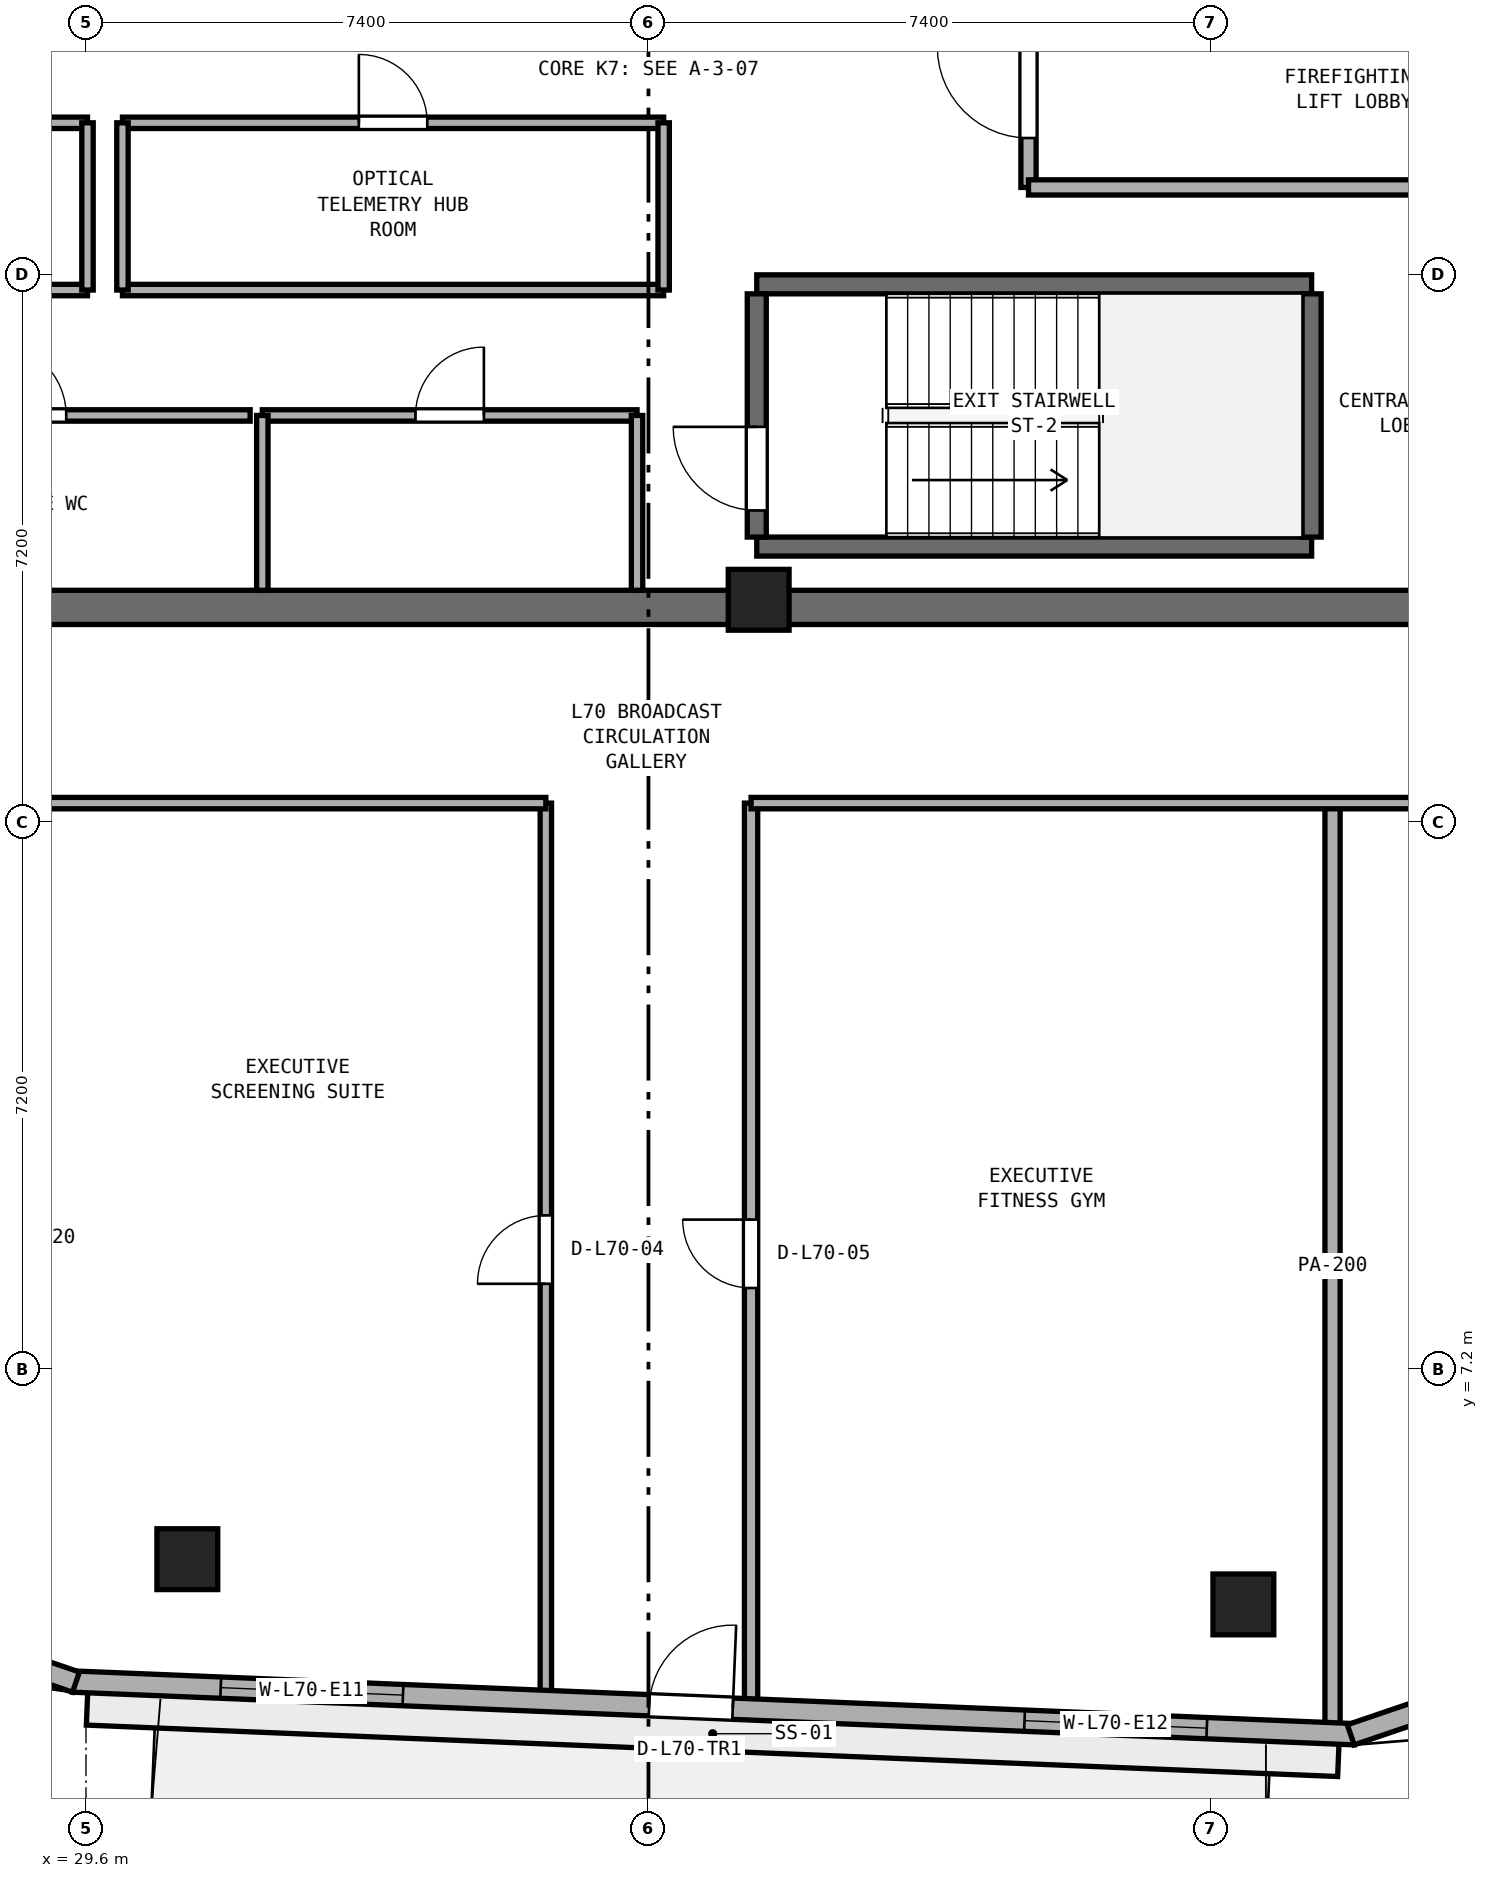
"""IFC4 building model, lengths in metres.
Left out: names, types, materials, properties, quantities, classifications, styles, units other than length and angle.
Written with IfcOpenShell. Run it as: python <this file> out.ifc"""

import sys

from ifc_helpers import new_model, si_unit, direction, frame, frame_2d, origin, origin_2d, place, context, subcontext, project, spatial, rectangle, extrude, element, fill, save


model = new_model("IFC4")
c1 = context("Model", 3, precision=1e-05, world=origin(), true_north=direction((0.0, 1.0)))
c2 = subcontext(c1, "Body", "Model", "MODEL_VIEW")
j1 = project(units=[si_unit("LENGTHUNIT", "METRE"), si_unit("PLANEANGLEUNIT", "RADIAN")], contexts=[c1])
p1 = place(None, origin())
s1 = spatial("IfcSite", under=j1, at=p1, CompositionType="ELEMENT")
p2 = place(p1, origin())
s2 = spatial("IfcBuilding", under=s1, at=p2, CompositionType="ELEMENT")
p3 = place(p2, frame((0.0, 0.0, 274.4)))
s3 = spatial("IfcBuildingStorey", under=s2, at=p3, CompositionType="ELEMENT", Elevation=274.4)
p4 = place(p3, frame((25.4, 17.225, 0.0), z_axis=(0.0, 0.0, 1.0), x_axis=(1.0, 0.0, 0.0)))
e1 = element("IfcWall", 1, at=p4, inside=s3, PredefinedType="SHEAR", context=c2, shape_type="SweptSolid", body=[
    extrude(rectangle(XDim=23.2, YDim=0.45, at=frame_2d((11.6, 0.0))), origin(), (0.0, 0.0, 1.0), 3.54),
])
p5 = place(p3, frame((38.45, 17.325, 0.0), z_axis=(0.0, 0.0, 1.0), x_axis=(1.0, 0.0, 0.0)))
e2 = element("IfcColumn", 2, at=p5, inside=s3, PredefinedType="PILASTER", context=c2, shape_type="SweptSolid", body=[
    extrude(rectangle(XDim=0.8, YDim=0.8, at=origin_2d()), origin(), (0.0, 0.0, 1.0), 3.8),
])
for number, where, z_axis, x_axis in (
    (3, (30.934, 4.703, 0.0), (0.0, 0.0, 1.0), (1.0, 0.0, 0.0)),
    (4, (44.827, 4.108, 0.0), (0.0, 0.0, 1.0), (1.0, 0.0, 0.0)),
):
    element("IfcColumn", number, at=place(p3, frame(where, z_axis=z_axis, x_axis=x_axis)), inside=s3, PredefinedType="COLUMN", context=c2, shape_type="SweptSolid", body=[
        extrude(rectangle(XDim=0.8, YDim=0.8, at=origin_2d()), origin(), (0.0, 0.0, 1.0), 3.8),
    ])
for number, where, z_axis, x_axis in (
    (5, (38.425, 18.025, 0.0), (0.0, 0.0, 1.0), (1.0, 0.0, 0.0)),
    (6, (38.425, 21.475, 0.0), (0.0, 0.0, 1.0), (1.0, 0.0, 0.0)),
):
    element("IfcWall", number, at=place(p3, frame(where, z_axis=z_axis, x_axis=x_axis)), inside=s3, PredefinedType="SHEAR", context=c2, shape_type="SweptSolid", body=[
        extrude(rectangle(XDim=7.3, YDim=0.25, at=frame_2d((3.65, 0.0))), origin(), (0.0, 0.0, 1.0), 3.54),
    ])
p6 = place(p3, frame((38.425, 18.15, 0.0), z_axis=(0.0, 0.0, 1.0), x_axis=(0.0, 1.0, 0.0)))
e7 = element("IfcWall", 7, at=p6, inside=s3, PredefinedType="SHEAR", context=c2, shape_type="SweptSolid", body=[
    extrude(rectangle(XDim=3.2, YDim=0.25, at=frame_2d((1.6, 0.0))), origin(), (0.0, 0.0, 1.0), 3.54),
])
p7 = place(p6, frame((0.35, 0.0, 0.0)))
e8 = element("IfcOpeningElement", 8, at=p7, cuts=e7, PredefinedType="OPENING", context=c2, shape_type="SweptSolid", body=[
    extrude(rectangle(XDim=1.1, YDim=2.15, at=frame_2d((0.55, 1.075))), frame((0.0, 0.135, 0.0), z_axis=(0.0, -1.0, 0.0), x_axis=(1.0, 0.0, 0.0)), (0.0, 0.0, 1.0), 0.27),
])
p8 = place(p3, frame((45.725, 18.15, 0.0), z_axis=(0.0, 0.0, 1.0), x_axis=(0.0, 1.0, 0.0)))
e9 = element("IfcWall", 9, at=p8, inside=s3, PredefinedType="SHEAR", context=c2, shape_type="SweptSolid", body=[
    extrude(rectangle(XDim=3.2, YDim=0.25, at=frame_2d((1.6, 0.0))), origin(), (0.0, 0.0, 1.0), 3.54),
])
p9 = place(p3, frame((42.0, 22.75, 0.0), z_axis=(0.0, 0.0, 1.0), x_axis=(0.0, 1.0, 0.0)))
e10 = element("IfcWall", 10, at=p9, inside=s3, PredefinedType="SOLIDWALL", context=c2, shape_type="SweptSolid", body=[
    extrude(rectangle(XDim=6.05, YDim=0.2, at=frame_2d((3.025, 0.0))), origin(), (0.0, 0.0, 1.0), 3.54),
])
p10 = place(p9, frame((0.65, 0.0, 0.0)))
e11 = element("IfcOpeningElement", 11, at=p10, cuts=e10, PredefinedType="OPENING", context=c2, shape_type="SweptSolid", body=[
    extrude(rectangle(XDim=1.2, YDim=2.15, at=frame_2d((0.6, 1.075))), frame((0.0, 0.11, 0.0), z_axis=(0.0, -1.0, 0.0), x_axis=(1.0, 0.0, 0.0)), (0.0, 0.0, 1.0), 0.22),
])
p11 = place(p3, frame((42.0, 22.75, 0.0), z_axis=(0.0, 0.0, 1.0), x_axis=(1.0, 0.0, 0.0)))
e12 = element("IfcWall", 12, at=p11, inside=s3, PredefinedType="SOLIDWALL", context=c2, shape_type="SweptSolid", body=[
    extrude(rectangle(XDim=6.15, YDim=0.2, at=frame_2d((3.075, 0.0))), origin(), (0.0, 0.0, 1.0), 3.54),
])
p12 = place(p3, frame((25.97, 19.75, 0.0), z_axis=(0.0, 0.0, 1.0), x_axis=(1.0, 0.0, 0.0)))
e13 = element("IfcWall", 13, at=p12, inside=s3, PredefinedType="PARTITIONING", context=c2, shape_type="SweptSolid", body=[
    extrude(rectangle(XDim=5.79, YDim=0.15, at=frame_2d((2.895, 0.0))), origin(), (0.0, 0.0, 1.0), 3.54),
])
p13 = place(p12, frame((2.42, 0.0, 0.0)))
e14 = element("IfcOpeningElement", 14, at=p13, cuts=e13, PredefinedType="OPENING", context=c2, shape_type="SweptSolid", body=[
    extrude(rectangle(XDim=0.95, YDim=2.1, at=frame_2d((0.475, 1.05))), frame((0.0, 0.085, 0.0), z_axis=(0.0, -1.0, 0.0), x_axis=(1.0, 0.0, 0.0)), (0.0, 0.0, 1.0), 0.17),
])
p14 = place(p3, frame((31.92, 19.75, 0.0), z_axis=(0.0, 0.0, 1.0), x_axis=(1.0, 0.0, 0.0)))
e15 = element("IfcWall", 15, at=p14, inside=s3, PredefinedType="PARTITIONING", context=c2, shape_type="SweptSolid", body=[
    extrude(rectangle(XDim=4.93, YDim=0.15, at=frame_2d((2.465, 0.0))), origin(), (0.0, 0.0, 1.0), 3.54),
])
p15 = place(p14, frame((2.015, 0.0, 0.0)))
e16 = element("IfcOpeningElement", 16, at=p15, cuts=e15, PredefinedType="OPENING", context=c2, shape_type="SweptSolid", body=[
    extrude(rectangle(XDim=0.9, YDim=2.1, at=frame_2d((0.45, 1.05))), frame((0.0, 0.085, 0.0), z_axis=(0.0, -1.0, 0.0), x_axis=(1.0, 0.0, 0.0)), (0.0, 0.0, 1.0), 0.17),
])
for number, where, z_axis, x_axis in (
    (17, (31.92, 17.45, 0.0), (0.0, 0.0, 1.0), (0.0, 1.0, 0.0)),
    (18, (36.85, 17.45, 0.0), (0.0, 0.0, 1.0), (0.0, 1.0, 0.0)),
):
    element("IfcWall", number, at=place(p3, frame(where, z_axis=z_axis, x_axis=x_axis)), inside=s3, PredefinedType="PARTITIONING", context=c2, shape_type="SweptSolid", body=[
        extrude(rectangle(XDim=2.3, YDim=0.15, at=frame_2d((1.15, 0.0))), origin(), (0.0, 0.0, 1.0), 3.54),
    ])
p16 = place(p3, frame((25.97, 21.4, 0.0), z_axis=(0.0, 0.0, 1.0), x_axis=(1.0, 0.0, 0.0)))
e19 = element("IfcWall", 19, at=p16, inside=s3, PredefinedType="PARTITIONING", context=c2, shape_type="SweptSolid", body=[
    extrude(rectangle(XDim=3.65, YDim=0.15, at=frame_2d((1.825, 0.0))), origin(), (0.0, 0.0, 1.0), 3.54),
])
p17 = place(p3, frame((25.97, 23.6, 0.0), z_axis=(0.0, 0.0, 1.0), x_axis=(1.0, 0.0, 0.0)))
e20 = element("IfcWall", 20, at=p17, inside=s3, PredefinedType="PARTITIONING", context=c2, shape_type="SweptSolid", body=[
    extrude(rectangle(XDim=3.65, YDim=0.15, at=frame_2d((1.825, 0.0))), origin(), (0.0, 0.0, 1.0), 3.54),
])
p18 = place(p17, frame((1.375, 0.0, 0.0)))
e21 = element("IfcOpeningElement", 21, at=p18, cuts=e20, PredefinedType="OPENING", context=c2, shape_type="SweptSolid", body=[
    extrude(rectangle(XDim=0.9, YDim=2.1, at=frame_2d((0.45, 1.05))), frame((0.0, 0.085, 0.0), z_axis=(0.0, -1.0, 0.0), x_axis=(1.0, 0.0, 0.0)), (0.0, 0.0, 1.0), 0.17),
])
p19 = place(p3, frame((29.62, 21.4, 0.0), z_axis=(0.0, 0.0, 1.0), x_axis=(0.0, 1.0, 0.0)))
e22 = element("IfcWall", 22, at=p19, inside=s3, PredefinedType="PARTITIONING", context=c2, shape_type="SweptSolid", body=[
    extrude(rectangle(XDim=2.2, YDim=0.15, at=frame_2d((1.1, 0.0))), origin(), (0.0, 0.0, 1.0), 3.54),
])
p20 = place(p3, frame((30.08, 21.4, 0.0), z_axis=(0.0, 0.0, 1.0), x_axis=(1.0, 0.0, 0.0)))
e23 = element("IfcWall", 23, at=p20, inside=s3, PredefinedType="PARTITIONING", context=c2, shape_type="SweptSolid", body=[
    extrude(rectangle(XDim=7.12, YDim=0.15, at=frame_2d((3.56, 0.0))), origin(), (0.0, 0.0, 1.0), 3.54),
])
p21 = place(p3, frame((30.08, 23.6, 0.0), z_axis=(0.0, 0.0, 1.0), x_axis=(1.0, 0.0, 0.0)))
e24 = element("IfcWall", 24, at=p21, inside=s3, PredefinedType="PARTITIONING", context=c2, shape_type="SweptSolid", body=[
    extrude(rectangle(XDim=7.12, YDim=0.15, at=frame_2d((3.56, 0.0))), origin(), (0.0, 0.0, 1.0), 3.54),
])
p22 = place(p21, frame((3.11, 0.0, 0.0)))
e25 = element("IfcOpeningElement", 25, at=p22, cuts=e24, PredefinedType="OPENING", context=c2, shape_type="SweptSolid", body=[
    extrude(rectangle(XDim=0.9, YDim=2.1, at=frame_2d((0.45, 1.05))), frame((0.0, 0.085, 0.0), z_axis=(0.0, -1.0, 0.0), x_axis=(1.0, 0.0, 0.0)), (0.0, 0.0, 1.0), 0.17),
])
for number, where, z_axis, x_axis in (
    (26, (30.08, 21.4, 0.0), (0.0, 0.0, 1.0), (0.0, 1.0, 0.0)),
    (27, (37.2, 21.4, 0.0), (0.0, 0.0, 1.0), (0.0, 1.0, 0.0)),
):
    element("IfcWall", number, at=place(p3, frame(where, z_axis=z_axis, x_axis=x_axis)), inside=s3, PredefinedType="PARTITIONING", context=c2, shape_type="SweptSolid", body=[
        extrude(rectangle(XDim=2.2, YDim=0.15, at=frame_2d((1.1, 0.0))), origin(), (0.0, 0.0, 1.0), 3.54),
    ])
p23 = place(p3, frame((46.0, 2.477, 0.0), z_axis=(0.0, 0.0, 1.0), x_axis=(0.0, 1.0, 0.0)))
e28 = element("IfcWall", 28, at=p23, inside=s3, PredefinedType="PARTITIONING", context=c2, shape_type="SweptSolid", body=[
    extrude(rectangle(XDim=12.173, YDim=0.2, at=frame_2d((6.086, 0.0))), origin(), (0.0, 0.0, 1.0), 3.54),
])
p24 = place(p3, frame((38.35, 2.792, 0.0), z_axis=(0.0, 0.0, 1.0), x_axis=(0.0, 1.0, 0.0)))
e29 = element("IfcWall", 29, at=p24, inside=s3, PredefinedType="PARTITIONING", context=c2, shape_type="SweptSolid", body=[
    extrude(rectangle(XDim=11.858, YDim=0.175, at=frame_2d((5.929, 0.0))), origin(), (0.0, 0.0, 1.0), 3.54),
])
p25 = place(p24, frame((5.479, 0.0, 0.0)))
e30 = element("IfcOpeningElement", 30, at=p25, cuts=e29, PredefinedType="OPENING", context=c2, shape_type="SweptSolid", body=[
    extrude(rectangle(XDim=0.9, YDim=2.1, at=frame_2d((0.45, 1.05))), frame((0.0, 0.097, 0.0), z_axis=(0.0, -1.0, 0.0), x_axis=(1.0, 0.0, 0.0)), (0.0, 0.0, 1.0), 0.195),
])
p26 = place(p3, frame((35.65, 2.902, 0.0), z_axis=(0.0, 0.0, 1.0), x_axis=(0.0, 1.0, 0.0)))
e31 = element("IfcWall", 31, at=p26, inside=s3, PredefinedType="PARTITIONING", context=c2, shape_type="SweptSolid", body=[
    extrude(rectangle(XDim=11.748, YDim=0.15, at=frame_2d((5.874, 0.0))), origin(), (0.0, 0.0, 1.0), 3.54),
])
p27 = place(p26, frame((5.424, 0.0, 0.0)))
e32 = element("IfcOpeningElement", 32, at=p27, cuts=e31, PredefinedType="OPENING", context=c2, shape_type="SweptSolid", body=[
    extrude(rectangle(XDim=0.9, YDim=2.1, at=frame_2d((0.45, 1.05))), frame((0.0, 0.085, 0.0), z_axis=(0.0, -1.0, 0.0), x_axis=(1.0, 0.0, 0.0)), (0.0, 0.0, 1.0), 0.17),
])
p28 = place(p3, frame((23.05, 14.65, 0.0), z_axis=(0.0, 0.0, 1.0), x_axis=(1.0, 0.0, 0.0)))
e33 = element("IfcWall", 33, at=p28, inside=s3, PredefinedType="PARTITIONING", context=c2, shape_type="SweptSolid", body=[
    extrude(rectangle(XDim=12.6, YDim=0.15, at=frame_2d((6.3, 0.0))), origin(), (0.0, 0.0, 1.0), 3.54),
])
p29 = place(p28, frame((2.645, 0.0, 0.0)))
e34 = element("IfcOpeningElement", 34, at=p29, cuts=e33, PredefinedType="OPENING", context=c2, shape_type="SweptSolid", body=[
    extrude(rectangle(XDim=0.9, YDim=2.1, at=frame_2d((0.45, 1.05))), frame((0.0, 0.085, 0.0), z_axis=(0.0, -1.0, 0.0), x_axis=(1.0, 0.0, 0.0)), (0.0, 0.0, 1.0), 0.17),
])
p30 = place(p3, frame((38.35, 14.65, 0.0), z_axis=(0.0, 0.0, 1.0), x_axis=(1.0, 0.0, 0.0)))
e35 = element("IfcWall", 35, at=p30, inside=s3, PredefinedType="PARTITIONING", context=c2, shape_type="SweptSolid", body=[
    extrude(rectangle(XDim=12.6, YDim=0.15, at=frame_2d((6.3, 0.0))), origin(), (0.0, 0.0, 1.0), 3.54),
])
p31 = place(p30, frame((9.555, 0.0, 0.0)))
e36 = element("IfcOpeningElement", 36, at=p31, cuts=e35, PredefinedType="OPENING", context=c2, shape_type="SweptSolid", body=[
    extrude(rectangle(XDim=0.9, YDim=2.1, at=frame_2d((0.45, 1.05))), frame((0.0, 0.085, 0.0), z_axis=(0.0, -1.0, 0.0), x_axis=(1.0, 0.0, 0.0)), (0.0, 0.0, 1.0), 0.17),
])
p32 = place(p3, frame((29.428, 3.093, 0.0), z_axis=(0.0, 0.0, 1.0), x_axis=(0.999156257967, -0.041070331944, 0.0)))
e37 = element("IfcWall", 37, at=p32, inside=s3, PredefinedType="STANDARD", context=c2, shape_type="SweptSolid", body=[
    extrude(rectangle(XDim=16.876, YDim=0.28, at=frame_2d((8.438, 0.0))), origin(), (0.0, 0.0, 1.0), 3.54),
])
p33 = place(p32, frame((7.588, 0.0, 0.0)))
e38 = element("IfcOpeningElement", 38, at=p33, cuts=e37, PredefinedType="OPENING", context=c2, shape_type="SweptSolid", body=[
    extrude(rectangle(XDim=1.1, YDim=2.2, at=frame_2d((0.55, 1.1))), frame((0.0, 0.15, 0.0), z_axis=(0.0, -1.0, 0.0), x_axis=(1.0, 0.0, 0.0)), (0.0, 0.0, 1.0), 0.3),
])
p34 = place(p32, frame((1.946, 0.0, 0.9)))
e39 = element("IfcOpeningElement", 39, at=p34, cuts=e37, PredefinedType="OPENING", context=c2, shape_type="SweptSolid", body=[
    extrude(rectangle(XDim=2.4, YDim=1.75, at=frame_2d((1.2, 0.875))), frame((0.0, 0.15, 0.0), z_axis=(0.0, -1.0, 0.0), x_axis=(1.0, 0.0, 0.0)), (0.0, 0.0, 1.0), 0.3),
])
p35 = place(p32, frame((12.53, 0.0, 0.9)))
e40 = element("IfcOpeningElement", 40, at=p35, cuts=e37, PredefinedType="OPENING", context=c2, shape_type="SweptSolid", body=[
    extrude(rectangle(XDim=2.4, YDim=1.75, at=frame_2d((1.2, 0.875))), frame((0.0, 0.15, 0.0), z_axis=(0.0, -1.0, 0.0), x_axis=(1.0, 0.0, 0.0)), (0.0, 0.0, 1.0), 0.3),
])
p36 = place(p3, frame((46.24, 2.393, 0.0), z_axis=(0.0, 0.0, 1.0), x_axis=(0.946759165502, 0.321942669643, 0.0)))
e41 = element("IfcWall", 41, at=p36, inside=s3, PredefinedType="STANDARD", context=c2, shape_type="SweptSolid", body=[
    extrude(rectangle(XDim=2.74, YDim=0.28, at=frame_2d((1.37, 0.0))), origin(), (0.0, 0.0, 1.0), 3.54),
])
p37 = place(p3, frame((27.411, 3.794, 0.0), z_axis=(0.0, 0.0, 1.0), x_axis=(0.945552869008, -0.325468542121, 0.0)))
e42 = element("IfcWall", 42, at=p37, inside=s3, PredefinedType="STANDARD", context=c2, shape_type="SweptSolid", body=[
    extrude(rectangle(XDim=2.176, YDim=0.28, at=frame_2d((1.088, 0.0))), origin(), (0.0, 0.0, 1.0), 3.54),
])
p38 = place(p7, origin())
e43 = element("IfcDoor", 43, at=p38, inside=s3, OperationType="SINGLE_SWING_RIGHT", PredefinedType="DOOR", context=c2, shape_type="SweptSolid", body=[
    extrude(rectangle(XDim=1.1, YDim=2.15, at=frame_2d((0.55, 1.075))), frame((0.0, 0.025, 0.0), z_axis=(0.0, -1.0, 0.0), x_axis=(1.0, 0.0, 0.0)), (0.0, 0.0, 1.0), 0.05),
])
fill(e8, e43)
p39 = place(p10, origin())
e44 = element("IfcDoor", 44, at=p39, inside=s3, OperationType="SINGLE_SWING_RIGHT", PredefinedType="DOOR", context=c2, shape_type="SweptSolid", body=[
    extrude(rectangle(XDim=1.2, YDim=2.15, at=frame_2d((0.6, 1.075))), frame((0.0, 0.025, 0.0), z_axis=(0.0, -1.0, 0.0), x_axis=(1.0, 0.0, 0.0)), (0.0, 0.0, 1.0), 0.05),
])
fill(e11, e44)
p40 = place(p13, origin())
e45 = element("IfcDoor", 45, at=p40, inside=s3, OperationType="SINGLE_SWING_LEFT", PredefinedType="DOOR", context=c2, shape_type="SweptSolid", body=[
    extrude(rectangle(XDim=0.95, YDim=2.1, at=frame_2d((0.475, 1.05))), frame((0.0, 0.025, 0.0), z_axis=(0.0, -1.0, 0.0), x_axis=(1.0, 0.0, 0.0)), (0.0, 0.0, 1.0), 0.05),
])
fill(e14, e45)
p41 = place(p15, origin())
e46 = element("IfcDoor", 46, at=p41, inside=s3, OperationType="SINGLE_SWING_RIGHT", PredefinedType="DOOR", context=c2, shape_type="SweptSolid", body=[
    extrude(rectangle(XDim=0.9, YDim=2.1, at=frame_2d((0.45, 1.05))), frame((0.0, 0.025, 0.0), z_axis=(0.0, -1.0, 0.0), x_axis=(1.0, 0.0, 0.0)), (0.0, 0.0, 1.0), 0.05),
])
fill(e16, e46)
p42 = place(p22, origin())
e47 = element("IfcDoor", 47, at=p42, inside=s3, OperationType="SINGLE_SWING_LEFT", PredefinedType="DOOR", context=c2, shape_type="SweptSolid", body=[
    extrude(rectangle(XDim=0.9, YDim=2.1, at=frame_2d((0.45, 1.05))), frame((0.0, 0.025, 0.0), z_axis=(0.0, -1.0, 0.0), x_axis=(1.0, 0.0, 0.0)), (0.0, 0.0, 1.0), 0.05),
])
fill(e25, e47)
p43 = place(p27, origin())
e48 = element("IfcDoor", 48, at=p43, inside=s3, OperationType="SINGLE_SWING_LEFT", PredefinedType="DOOR", context=c2, shape_type="SweptSolid", body=[
    extrude(rectangle(XDim=0.9, YDim=2.1, at=frame_2d((0.45, 1.05))), frame((0.0, 0.025, 0.0), z_axis=(0.0, -1.0, 0.0), x_axis=(1.0, 0.0, 0.0)), (0.0, 0.0, 1.0), 0.05),
])
fill(e32, e48)
p44 = place(p25, origin())
e49 = element("IfcDoor", 49, at=p44, inside=s3, OperationType="SINGLE_SWING_RIGHT", PredefinedType="DOOR", context=c2, shape_type="SweptSolid", body=[
    extrude(rectangle(XDim=0.9, YDim=2.1, at=frame_2d((0.45, 1.05))), frame((0.0, 0.025, 0.0), z_axis=(0.0, -1.0, 0.0), x_axis=(1.0, 0.0, 0.0)), (0.0, 0.0, 1.0), 0.05),
])
fill(e30, e49)
p45 = place(p33, origin())
e50 = element("IfcDoor", 50, at=p45, inside=s3, OperationType="SINGLE_SWING_RIGHT", PredefinedType="DOOR", context=c2, shape_type="SweptSolid", body=[
    extrude(rectangle(XDim=1.1, YDim=2.2, at=frame_2d((0.55, 1.1))), frame((0.0, 0.025, 0.0), z_axis=(0.0, -1.0, 0.0), x_axis=(1.0, 0.0, 0.0)), (0.0, 0.0, 1.0), 0.05),
])
fill(e38, e50)
p46 = place(p34, origin())
e51 = element("IfcWindow", 51, at=p46, inside=s3, PartitioningType="SINGLE_PANEL", PredefinedType="WINDOW", context=c2, shape_type="SweptSolid", body=[
    extrude(rectangle(XDim=2.4, YDim=1.75, at=frame_2d((1.2, 0.875))), frame((0.0, 0.03, 0.0), z_axis=(0.0, -1.0, 0.0), x_axis=(1.0, 0.0, 0.0)), (0.0, 0.0, 1.0), 0.06),
])
fill(e39, e51)
p47 = place(p35, origin())
e52 = element("IfcWindow", 52, at=p47, inside=s3, PartitioningType="SINGLE_PANEL", PredefinedType="WINDOW", context=c2, shape_type="SweptSolid", body=[
    extrude(rectangle(XDim=2.4, YDim=1.75, at=frame_2d((1.2, 0.875))), frame((0.0, 0.03, 0.0), z_axis=(0.0, -1.0, 0.0), x_axis=(1.0, 0.0, 0.0)), (0.0, 0.0, 1.0), 0.06),
])
fill(e40, e52)
save(model, sys.argv[1])
